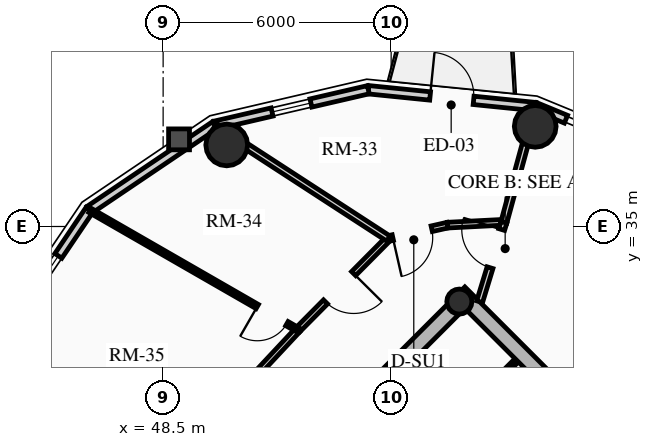
"""IFC4 building model, lengths in metres.
Left out: names, types, materials, properties, quantities, classifications, styles, units other than length and angle.
Written with IfcOpenShell. Run it as: python <this file> out.ifc"""

import sys

from ifc_helpers import new_model, si_unit, direction, frame, frame_2d, origin, origin_2d, place, context, subcontext, project, spatial, rectangle, circle, hollow_circle, extrude, source, transform, mapped, element, fill, save


model = new_model("IFC4")
c1 = context("Model", 3, precision=1e-05, world=origin(), true_north=direction((0.0, 1.0)))
c2 = subcontext(c1, "Body", "Model", "MODEL_VIEW")
j1 = project(units=[si_unit("LENGTHUNIT", "METRE"), si_unit("PLANEANGLEUNIT", "RADIAN")], contexts=[c1])
p1 = place(None, origin())
s1 = spatial("IfcSite", under=j1, at=p1, CompositionType="ELEMENT")
p2 = place(p1, origin())
s2 = spatial("IfcBuilding", under=s1, at=p2, CompositionType="ELEMENT")
p3 = place(p2, frame((0.0, 0.0, 205.39)))
s3 = spatial("IfcBuildingStorey", under=s2, at=p3, CompositionType="ELEMENT", Elevation=205.39)
p4 = place(p3, frame((66.268, 23.298, 0.0), z_axis=(0.0, 0.0, 1.0), x_axis=(-0.707106781187, 0.707106781187, 0.0)))
e1 = element("IfcWall", 1, at=p4, inside=s3, PredefinedType="SHEAR", context=c2, shape_type="SweptSolid", body=[
    extrude(rectangle(XDim=14.1, YDim=0.4, at=frame_2d((7.05, 0.0))), origin(), (0.0, 0.0, 1.0), 2.91),
])
p5 = place(p3, frame((48.873, 25.561, 0.0), z_axis=(0.0, 0.0, 1.0), x_axis=(0.707106781187, 0.707106781187, 0.0)))
e2 = element("IfcWall", 2, at=p5, inside=s3, PredefinedType="SHEAR", context=c2, shape_type="SweptSolid", body=[
    extrude(rectangle(XDim=10.7, YDim=0.4, at=frame_2d((5.35, 0.0))), origin(), (0.0, 0.0, 1.0), 2.91),
])
m1 = source(origin(), c2, "Body", "SweptSolid", [
    extrude(rectangle(XDim=1.5, YDim=2.02, at=frame_2d((0.75, 1.01))), frame((0.0, 0.21, 0.0), z_axis=(0.0, -1.0, 0.0), x_axis=(1.0, 0.0, 0.0)), (0.0, 0.0, 1.0), 0.42),
])
p6 = place(p5, frame((4.6, 0.0, 0.0)))
e3 = element("IfcOpeningElement", 3, at=p6, cuts=e2, PredefinedType="OPENING", context=c2, shape_type="MappedRepresentation", body=[
    mapped(m1, transform((0.0, 0.0, 0.0), x_axis=(1.0, 0.0, 0.0), y_axis=(0.0, 1.0, 0.0), z_axis=(0.0, 0.0, 1.0), scale=1.0)),
])
p7 = place(p3, frame((56.294, 33.024, 0.0), z_axis=(0.0, 0.0, 1.0), x_axis=(0.707106781187, 0.707106781187, 0.0)))
e4 = element("IfcColumn", 4, at=p7, inside=s3, PredefinedType="COLUMN", context=c2, shape_type="SweptSolid", body=[
    extrude(hollow_circle(Radius=0.33, WallThickness=0.025, at=origin_2d()), origin(), (0.0, 0.0, 1.0), 2.91),
])
for number, where, z_axis, x_axis in (
    (5, (58.291, 37.635, 0.0), (0.0, 0.0, 1.0), (1.0, 0.0, 0.0)),
    (6, (50.173, 37.146, 0.0), (0.0, 0.0, 1.0), (1.0, 0.0, 0.0)),
):
    element("IfcColumn", number, at=place(p3, frame(where, z_axis=z_axis, x_axis=x_axis)), inside=s3, PredefinedType="USERDEFINED", context=c2, shape_type="SweptSolid", body=[
        extrude(circle(Radius=0.55, at=origin_2d()), origin(), (0.0, 0.0, 1.0), 2.91),
    ])
p8 = place(p3, frame((58.295, 38.155, 0.0), z_axis=(0.0, 0.0, 1.0), x_axis=(0.924515260676, -0.381145028536, 0.0)))
e7 = element("IfcWall", 7, at=p8, inside=s3, PredefinedType="SOLIDWALL", context=c2, shape_type="SweptSolid", body=[
    extrude(rectangle(XDim=0.87, YDim=0.22, at=frame_2d((0.435, 0.0))), origin(), (0.0, 0.0, 1.0), 2.322),
])
p9 = place(p3, frame((53.9, 38.599, 0.0), z_axis=(0.0, 0.0, 1.0), x_axis=(0.994929930991, -0.100570534541, 0.0)))
e8 = element("IfcWall", 8, at=p9, inside=s3, PredefinedType="SOLIDWALL", context=c2, shape_type="SweptSolid", body=[
    extrude(rectangle(XDim=4.418, YDim=0.22, at=frame_2d((2.209, 0.0))), origin(), (0.0, 0.0, 1.0), 2.322),
])
m2 = source(origin(), c2, "Body", "SweptSolid", [
    extrude(rectangle(XDim=1.15, YDim=2.005, at=frame_2d((0.575, 1.002))), frame((0.0, 0.12, 0.0), z_axis=(0.0, -1.0, 0.0), x_axis=(1.0, 0.0, 0.0)), (0.0, 0.0, 1.0), 0.24),
])
p10 = place(p9, frame((1.634, 0.0, 0.0)))
e9 = element("IfcOpeningElement", 9, at=p10, cuts=e8, PredefinedType="OPENING", context=c2, shape_type="MappedRepresentation", body=[
    mapped(m2, transform((0.0, 0.0, 0.0), x_axis=(1.0, 0.0, 0.0), y_axis=(0.0, 1.0, 0.0), z_axis=(0.0, 0.0, 1.0), scale=1.0)),
])
p11 = place(p3, frame((49.856, 37.663, 0.0), z_axis=(0.0, 0.0, 1.0), x_axis=(0.974249228678, 0.225473813158, 0.0)))
e10 = element("IfcWall", 10, at=p11, inside=s3, PredefinedType="SOLIDWALL", context=c2, shape_type="SweptSolid", body=[
    extrude(rectangle(XDim=4.15, YDim=0.22, at=frame_2d((2.075, 0.0))), origin(), (0.0, 0.0, 1.0), 2.322),
])
m3 = source(origin(), c2, "Body", "SweptSolid", [
    extrude(rectangle(XDim=1.05, YDim=1.3, at=frame_2d((0.525, 0.65))), frame((0.0, 0.12, 0.0), z_axis=(0.0, -1.0, 0.0), x_axis=(1.0, 0.0, 0.0)), (0.0, 0.0, 1.0), 0.24),
])
p12 = place(p11, frame((1.55, 0.0, 0.65)))
e11 = element("IfcOpeningElement", 11, at=p12, cuts=e10, PredefinedType="OPENING", context=c2, shape_type="MappedRepresentation", body=[
    mapped(m3, transform((0.0, 0.0, 0.0), x_axis=(1.0, 0.0, 0.0), y_axis=(0.0, 1.0, 0.0), z_axis=(0.0, 0.0, 1.0), scale=1.0)),
])
p13 = place(p3, frame((46.561, 35.439, 0.0), z_axis=(0.0, 0.0, 1.0), x_axis=(0.828833723692, 0.559495003079, 0.0)))
e12 = element("IfcWall", 12, at=p13, inside=s3, PredefinedType="SOLIDWALL", context=c2, shape_type="SweptSolid", body=[
    extrude(rectangle(XDim=3.976, YDim=0.22, at=frame_2d((1.988, 0.0))), origin(), (0.0, 0.0, 1.0), 2.322),
])
p14 = place(p3, frame((44.337, 32.144, 0.0), z_axis=(0.0, 0.0, 1.0), x_axis=(0.559495003079, 0.828833723692, 0.0)))
e13 = element("IfcWall", 13, at=p14, inside=s3, PredefinedType="SOLIDWALL", context=c2, shape_type="SweptSolid", body=[
    extrude(rectangle(XDim=3.976, YDim=0.22, at=frame_2d((1.988, 0.0))), origin(), (0.0, 0.0, 1.0), 2.322),
])
p15 = place(p14, frame((1.463, 0.0, 0.65)))
e14 = element("IfcOpeningElement", 14, at=p15, cuts=e13, PredefinedType="OPENING", context=c2, shape_type="MappedRepresentation", body=[
    mapped(m3, transform((0.0, 0.0, 0.0), x_axis=(1.0, 0.0, 0.0), y_axis=(0.0, 1.0, 0.0), z_axis=(0.0, 0.0, 1.0), scale=1.0)),
])
p16 = place(p3, frame((55.492, 29.167, 0.0), z_axis=(0.0, 0.0, 1.0), x_axis=(0.707144688645, 0.707068871696, 0.0)))
e15 = element("IfcWall", 15, at=p16, inside=s3, PredefinedType="PARTITIONING", context=c2, shape_type="SweptSolid", body=[
    extrude(rectangle(XDim=3.22, YDim=0.125, at=frame_2d((1.61, 0.0))), origin(), (0.0, 0.0, 1.0), 2.222),
])
p17 = place(p3, frame((57.467, 35.111, 0.0), z_axis=(0.0, 0.0, 1.0), x_axis=(-0.998691757323, -0.051134859488, 0.0)))
e16 = element("IfcWall", 16, at=p17, inside=s3, PredefinedType="PARTITIONING", context=c2, shape_type="SweptSolid", body=[
    extrude(rectangle(XDim=1.485, YDim=0.15, at=frame_2d((0.742, 0.0))), origin(), (0.0, 0.0, 1.0), 2.322),
])
p18 = place(p3, frame((55.984, 35.035, 0.0), z_axis=(0.0, 0.0, 1.0), x_axis=(-0.975290305708, -0.22092718165, 0.0)))
e17 = element("IfcWall", 17, at=p18, inside=s3, PredefinedType="PARTITIONING", context=c2, shape_type="SweptSolid", body=[
    extrude(rectangle(XDim=1.597, YDim=0.15, at=frame_2d((0.798, 0.0))), origin(), (0.0, 0.0, 1.0), 2.255),
])
m4 = source(origin(), c2, "Body", "SweptSolid", [
    extrude(rectangle(XDim=1.05, YDim=2.015, at=frame_2d((0.525, 1.007))), frame((0.0, 0.085, 0.0), z_axis=(0.0, -1.0, 0.0), x_axis=(1.0, 0.0, 0.0)), (0.0, 0.0, 1.0), 0.17),
])
p19 = place(p18, frame((0.427, 0.0, 0.0)))
e18 = element("IfcOpeningElement", 18, at=p19, cuts=e17, PredefinedType="OPENING", context=c2, shape_type="MappedRepresentation", body=[
    mapped(m4, transform((0.0, 0.0, 0.0), x_axis=(1.0, 0.0, 0.0), y_axis=(0.0, 1.0, 0.0), z_axis=(0.0, 0.0, 1.0), scale=1.0)),
])
p20 = place(p3, frame((54.427, 34.683, 0.0), z_axis=(0.0, 0.0, 1.0), x_axis=(-0.704178989986, -0.710022499687, 0.0)))
e19 = element("IfcWall", 19, at=p20, inside=s3, PredefinedType="PARTITIONING", context=c2, shape_type="SweptSolid", body=[
    extrude(rectangle(XDim=3.384, YDim=0.15, at=frame_2d((1.692, 0.0))), origin(), (0.0, 0.0, 1.0), 2.322),
])
p21 = place(p20, frame((1.298, 0.0, 0.0)))
e20 = element("IfcOpeningElement", 20, at=p21, cuts=e19, PredefinedType="OPENING", context=c2, shape_type="MappedRepresentation", body=[
    mapped(m4, transform((0.0, 0.0, 0.0), x_axis=(1.0, 0.0, 0.0), y_axis=(0.0, 1.0, 0.0), z_axis=(0.0, 0.0, 1.0), scale=1.0)),
])
p22 = place(p3, frame((52.043, 32.28, 0.0), z_axis=(0.0, 0.0, 1.0), x_axis=(-0.682606081633, -0.730786519661, 0.0)))
e21 = element("IfcWall", 21, at=p22, inside=s3, PredefinedType="PARTITIONING", context=c2, shape_type="SweptSolid", body=[
    extrude(rectangle(XDim=6.527, YDim=0.15, at=frame_2d((3.263, 0.0))), origin(), (0.0, 0.0, 1.0), 2.255),
])
p23 = place(p3, frame((57.467, 35.111, 0.0), z_axis=(0.0, 0.0, 1.0), x_axis=(0.263354670488, 0.964699081337, 0.0)))
e22 = element("IfcWall", 22, at=p23, inside=s3, PredefinedType="PARTITIONING", context=c2, shape_type="SweptSolid", body=[
    extrude(rectangle(XDim=3.134, YDim=0.16, at=frame_2d((1.567, 0.0))), origin(), (0.0, 0.0, 1.0), 2.322),
])
p24 = place(p3, frame((54.427, 34.683, 0.0), z_axis=(0.0, 0.0, 1.0), x_axis=(-0.83860663594, 0.544737469023, 0.0)))
e23 = element("IfcWall", 23, at=p24, inside=s3, PredefinedType="PARTITIONING", context=c2, shape_type="SweptSolid", body=[
    extrude(rectangle(XDim=5.439, YDim=0.16, at=frame_2d((2.72, 0.0))), origin(), (0.0, 0.0, 1.0), 2.322),
])
p25 = place(p3, frame((47.588, 27.51, 0.0), z_axis=(0.0, 0.0, 1.0), x_axis=(-0.573073195236, 0.819504187239, 0.0)))
e24 = element("IfcWall", 24, at=p25, inside=s3, PredefinedType="PARTITIONING", context=c2, shape_type="SweptSolid", body=[
    extrude(rectangle(XDim=5.643, YDim=0.16, at=frame_2d((2.822, 0.0))), origin(), (0.0, 0.0, 1.0), 2.322),
])
p26 = place(p3, frame((56.828, 33.021, 0.0), z_axis=(0.0, 0.0, 1.0), x_axis=(0.292139093972, 0.956375841274, 0.0)))
e25 = element("IfcWall", 25, at=p26, inside=s3, PredefinedType="PARTITIONING", context=c2, shape_type="SweptSolid", body=[
    extrude(rectangle(XDim=2.186, YDim=0.16, at=frame_2d((1.093, 0.0))), origin(), (0.0, 0.0, 1.0), 2.255),
])
m5 = source(origin(), c2, "Body", "SweptSolid", [
    extrude(rectangle(XDim=1.05, YDim=2.015, at=frame_2d((0.525, 1.007))), frame((0.0, 0.09, 0.0), z_axis=(0.0, -1.0, 0.0), x_axis=(1.0, 0.0, 0.0)), (0.0, 0.0, 1.0), 0.18),
])
p27 = place(p26, frame((0.936, 0.0, 0.0)))
e26 = element("IfcOpeningElement", 26, at=p27, cuts=e25, PredefinedType="OPENING", context=c2, shape_type="MappedRepresentation", body=[
    mapped(m5, transform((0.0, 0.0, 0.0), x_axis=(1.0, 0.0, 0.0), y_axis=(0.0, 1.0, 0.0), z_axis=(0.0, 0.0, 1.0), scale=1.0)),
])
p28 = place(p3, frame((52.043, 32.28, 0.0), z_axis=(0.0, 0.0, 1.0), x_axis=(-0.866853616581, 0.498562741709, 0.0)))
e27 = element("IfcWall", 27, at=p28, inside=s3, PredefinedType="PARTITIONING", context=c2, shape_type="SweptSolid", body=[
    extrude(rectangle(XDim=6.308, YDim=0.125, at=frame_2d((3.154, 0.0))), origin(), (0.0, 0.0, 1.0), 2.322),
])
m6 = source(origin(), c2, "Body", "SweptSolid", [
    extrude(rectangle(XDim=0.9, YDim=2.005, at=frame_2d((0.45, 1.002))), frame((0.0, 0.073, 0.0), z_axis=(0.0, -1.0, 0.0), x_axis=(1.0, 0.0, 0.0)), (0.0, 0.0, 1.0), 0.145),
])
p29 = place(p28, frame((0.33, 0.0, 0.0)))
e28 = element("IfcOpeningElement", 28, at=p29, cuts=e27, PredefinedType="OPENING", context=c2, shape_type="MappedRepresentation", body=[
    mapped(m6, transform((0.0, 0.0, 0.0), x_axis=(1.0, 0.0, 0.0), y_axis=(0.0, 1.0, 0.0), z_axis=(0.0, 0.0, 1.0), scale=1.0)),
])
m7 = source(origin(), c2, "Body", "SweptSolid", [
    extrude(rectangle(XDim=1.15, YDim=2.005, at=frame_2d((0.575, 1.002))), frame((0.0, 0.025, 0.0), z_axis=(0.0, -1.0, 0.0), x_axis=(1.0, 0.0, 0.0)), (0.0, 0.0, 1.0), 0.05),
])
p30 = place(p10, origin())
e29 = element("IfcDoor", 29, at=p30, inside=s3, OperationType="SINGLE_SWING_LEFT", PredefinedType="DOOR", context=c2, shape_type="MappedRepresentation", body=[
    mapped(m7, transform((0.0, 0.0, 0.0), x_axis=(1.0, 0.0, 0.0), y_axis=(0.0, 1.0, 0.0), z_axis=(0.0, 0.0, 1.0), scale=1.0)),
])
fill(e9, e29)
m8 = source(origin(), c2, "Body", "SweptSolid", [
    extrude(rectangle(XDim=1.05, YDim=1.3, at=frame_2d((0.525, 0.65))), frame((0.0, 0.03, 0.0), z_axis=(0.0, -1.0, 0.0), x_axis=(1.0, 0.0, 0.0)), (0.0, 0.0, 1.0), 0.06),
])
p31 = place(p12, origin())
e30 = element("IfcWindow", 30, at=p31, inside=s3, PartitioningType="SINGLE_PANEL", PredefinedType="WINDOW", context=c2, shape_type="MappedRepresentation", body=[
    mapped(m8, transform((0.0, 0.0, 0.0), x_axis=(1.0, 0.0, 0.0), y_axis=(0.0, 1.0, 0.0), z_axis=(0.0, 0.0, 1.0), scale=1.0)),
])
fill(e11, e30)
p32 = place(p15, origin())
e31 = element("IfcWindow", 31, at=p32, inside=s3, PartitioningType="SINGLE_PANEL", PredefinedType="WINDOW", context=c2, shape_type="MappedRepresentation", body=[
    mapped(m8, transform((0.0, 0.0, 0.0), x_axis=(1.0, 0.0, 0.0), y_axis=(0.0, 1.0, 0.0), z_axis=(0.0, 0.0, 1.0), scale=1.0)),
])
fill(e14, e31)
m9 = source(origin(), c2, "Body", "SweptSolid", [
    extrude(rectangle(XDim=1.05, YDim=2.015, at=frame_2d((0.525, 1.007))), frame((0.0, 0.025, 0.0), z_axis=(0.0, -1.0, 0.0), x_axis=(1.0, 0.0, 0.0)), (0.0, 0.0, 1.0), 0.05),
])
p33 = place(p27, origin())
e32 = element("IfcDoor", 32, at=p33, inside=s3, OperationType="SINGLE_SWING_RIGHT", PredefinedType="DOOR", context=c2, shape_type="MappedRepresentation", body=[
    mapped(m9, transform((0.0, 0.0, 0.0), x_axis=(1.0, 0.0, 0.0), y_axis=(0.0, 1.0, 0.0), z_axis=(0.0, 0.0, 1.0), scale=1.0)),
])
fill(e26, e32)
p34 = place(p19, origin())
e33 = element("IfcDoor", 33, at=p34, inside=s3, OperationType="SINGLE_SWING_RIGHT", PredefinedType="DOOR", context=c2, shape_type="MappedRepresentation", body=[
    mapped(m9, transform((0.0, 0.0, 0.0), x_axis=(1.0, 0.0, 0.0), y_axis=(0.0, 1.0, 0.0), z_axis=(0.0, 0.0, 1.0), scale=1.0)),
])
fill(e18, e33)
p35 = place(p21, origin())
e34 = element("IfcDoor", 34, at=p35, inside=s3, OperationType="SINGLE_SWING_LEFT", PredefinedType="DOOR", context=c2, shape_type="MappedRepresentation", body=[
    mapped(m9, transform((0.0, 0.0, 0.0), x_axis=(1.0, 0.0, 0.0), y_axis=(0.0, 1.0, 0.0), z_axis=(0.0, 0.0, 1.0), scale=1.0)),
])
fill(e20, e34)
m10 = source(origin(), c2, "Body", "SweptSolid", [
    extrude(rectangle(XDim=0.9, YDim=2.005, at=frame_2d((0.45, 1.002))), frame((0.0, 0.025, 0.0), z_axis=(0.0, -1.0, 0.0), x_axis=(1.0, 0.0, 0.0)), (0.0, 0.0, 1.0), 0.05),
])
p36 = place(p29, origin())
e35 = element("IfcDoor", 35, at=p36, inside=s3, OperationType="SINGLE_SWING_RIGHT", PredefinedType="DOOR", context=c2, shape_type="MappedRepresentation", body=[
    mapped(m10, transform((0.0, 0.0, 0.0), x_axis=(1.0, 0.0, 0.0), y_axis=(0.0, 1.0, 0.0), z_axis=(0.0, 0.0, 1.0), scale=1.0)),
])
fill(e28, e35)
save(model, sys.argv[1])
